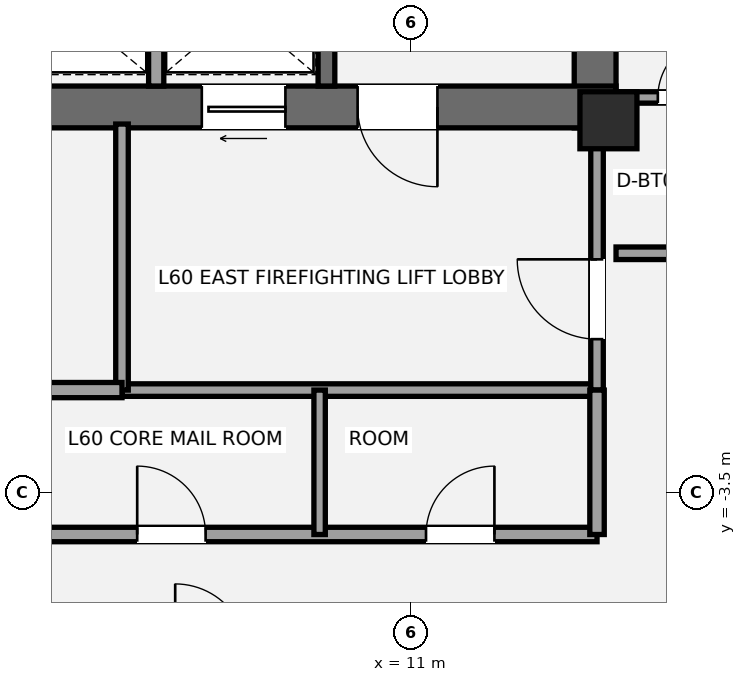
"""IFC4 building model, lengths in metres.
Left out: names, types, materials, properties, quantities, classifications, styles, units other than length and angle.
Written with IfcOpenShell. Run it as: python <this file> out.ifc"""

import sys

from ifc_helpers import new_model, si_unit, direction, frame, frame_2d, origin, origin_2d, place, context, subcontext, project, spatial, rectangle, extrude, element, fill, save


model = new_model("IFC4")
c1 = context("Model", 3, precision=1e-05, world=origin(), true_north=direction((0.0, 1.0)))
c2 = subcontext(c1, "Body", "Model", "MODEL_VIEW")
j1 = project(units=[si_unit("LENGTHUNIT", "METRE"), si_unit("PLANEANGLEUNIT", "RADIAN")], contexts=[c1])
p1 = place(None, origin())
s1 = spatial("IfcSite", under=j1, at=p1, CompositionType="ELEMENT")
p2 = place(p1, origin())
s2 = spatial("IfcBuilding", under=s1, at=p2, CompositionType="ELEMENT")
p3 = place(p2, frame((0.0, 0.0, 216.3)))
s3 = spatial("IfcBuildingStorey", under=s2, at=p3, CompositionType="ELEMENT", Elevation=216.3)
p4 = place(p3, frame((13.425, 1.3, 0.0), z_axis=(0.0, 0.0, 1.0), x_axis=(0.0, 1.0, 0.0)))
e1 = element("IfcWall", 1, at=p4, inside=s3, PredefinedType="SHEAR", context=c2, shape_type="SweptSolid", body=[
    extrude(rectangle(XDim=8.25, YDim=0.55, at=frame_2d((4.125, 0.0))), origin(), (0.0, 0.0, 1.0), 3.15),
])
p5 = place(p3, frame((13.7, 1.575, 0.0), z_axis=(0.0, 0.0, 1.0), x_axis=(-1.0, 0.0, 0.0)))
e2 = element("IfcWall", 2, at=p5, inside=s3, PredefinedType="SHEAR", context=c2, shape_type="SweptSolid", body=[
    extrude(rectangle(XDim=8.775, YDim=0.55, at=frame_2d((4.387, 0.0))), origin(), (0.0, 0.0, 1.0), 3.15),
])
p6 = place(p5, frame((2.35, 0.0, 0.0)))
e3 = element("IfcOpeningElement", 3, at=p6, cuts=e2, PredefinedType="OPENING", context=c2, shape_type="SweptSolid", body=[
    extrude(rectangle(XDim=1.05, YDim=2.15, at=frame_2d((0.525, 1.075))), frame((0.0, 0.285, 0.0), z_axis=(0.0, -1.0, 0.0), x_axis=(1.0, 0.0, 0.0)), (0.0, 0.0, 1.0), 0.57),
])
p7 = place(p5, frame((4.35, 0.0, 0.0)))
e4 = element("IfcOpeningElement", 4, at=p7, cuts=e2, PredefinedType="OPENING", context=c2, shape_type="SweptSolid", body=[
    extrude(rectangle(XDim=1.1, YDim=2.2, at=frame_2d((0.55, 1.1))), frame((0.0, 0.285, 0.0), z_axis=(0.0, -1.0, 0.0), x_axis=(1.0, 0.0, 0.0)), (0.0, 0.0, 1.0), 0.57),
])
p8 = place(p3, frame((9.89, 1.85, 0.0), z_axis=(0.0, 0.0, 1.0), x_axis=(0.0, 1.0, 0.0)))
e5 = element("IfcWall", 5, at=p8, inside=s3, PredefinedType="SHEAR", context=c2, shape_type="SweptSolid", body=[
    extrude(rectangle(XDim=7.15, YDim=0.22, at=frame_2d((3.575, 0.0))), origin(), (0.0, 0.0, 1.0), 3.15),
])
p9 = place(p3, frame((13.6, 1.4, 0.0), z_axis=(0.0, 0.0, 1.0), x_axis=(1.0, 0.0, 0.0)))
e6 = element("IfcColumn", 6, at=p9, inside=s3, PredefinedType="PILASTER", context=c2, shape_type="SweptSolid", body=[
    extrude(rectangle(XDim=0.75, YDim=0.75, at=origin_2d()), origin(), (0.0, 0.0, 1.0), 3.15),
])
p10 = place(p3, frame((7.2, -2.15, 0.0), z_axis=(0.0, 0.0, 1.0), x_axis=(1.0, 0.0, 0.0)))
e7 = element("IfcWall", 7, at=p10, inside=s3, PredefinedType="PARTITIONING", context=c2, shape_type="SweptSolid", body=[
    extrude(rectangle(XDim=6.25, YDim=0.165, at=frame_2d((3.125, 0.0))), origin(), (0.0, 0.0, 1.0), 2.97),
])
p11 = place(p3, frame((7.2, -2.15, 0.0), z_axis=(0.0, 0.0, 1.0), x_axis=(0.0, 1.0, 0.0)))
e8 = element("IfcWall", 8, at=p11, inside=s3, PredefinedType="PARTITIONING", context=c2, shape_type="SweptSolid", body=[
    extrude(rectangle(XDim=3.5, YDim=0.165, at=frame_2d((1.75, 0.0))), origin(), (0.0, 0.0, 1.0), 2.423),
])
p12 = place(p3, frame((13.45, -2.15, 0.0), z_axis=(0.0, 0.0, 1.0), x_axis=(0.0, 1.0, 0.0)))
e9 = element("IfcWall", 9, at=p12, inside=s3, PredefinedType="PARTITIONING", context=c2, shape_type="SweptSolid", body=[
    extrude(rectangle(XDim=3.5, YDim=0.165, at=frame_2d((1.75, 0.0))), origin(), (0.0, 0.0, 1.0), 2.423),
])
p13 = place(p12, frame((0.67, 0.0, 0.0)))
e10 = element("IfcOpeningElement", 10, at=p13, cuts=e9, PredefinedType="OPENING", context=c2, shape_type="SweptSolid", body=[
    extrude(rectangle(XDim=1.05, YDim=2.15, at=frame_2d((0.525, 1.075))), frame((0.0, 0.093, 0.0), z_axis=(0.0, -1.0, 0.0), x_axis=(1.0, 0.0, 0.0)), (0.0, 0.0, 1.0), 0.185),
])
p14 = place(p3, frame((4.95, -2.15, 0.0), z_axis=(0.0, 0.0, 1.0), x_axis=(1.0, 0.0, 0.0)))
e11 = element("IfcWall", 11, at=p14, inside=s3, PredefinedType="SOLIDWALL", context=c2, shape_type="SweptSolid", body=[
    extrude(rectangle(XDim=2.25, YDim=0.2, at=frame_2d((1.125, 0.0))), origin(), (0.0, 0.0, 1.0), 2.97),
])
p15 = place(p3, frame((7.65, 1.85, 0.0), z_axis=(0.0, 0.0, 1.0), x_axis=(0.0, 1.0, 0.0)))
e12 = element("IfcWall", 12, at=p15, inside=s3, PredefinedType="SOLIDWALL", context=c2, shape_type="SweptSolid", body=[
    extrude(rectangle(XDim=1.97, YDim=0.2, at=frame_2d((0.985, 0.0))), origin(), (0.0, 0.0, 1.0), 2.97),
])
p16 = place(p3, frame((2.1, -4.05, 0.0), z_axis=(0.0, 0.0, 1.0), x_axis=(1.0, 0.0, 0.0)))
e13 = element("IfcWall", 13, at=p16, inside=s3, PredefinedType="PLUMBINGWALL", context=c2, shape_type="SweptSolid", body=[
    extrude(rectangle(XDim=11.35, YDim=0.19, at=frame_2d((5.675, 0.0))), origin(), (0.0, 0.0, 1.0), 2.357),
])
p17 = place(p16, frame((1.4, 0.0, 0.0)))
e14 = element("IfcOpeningElement", 14, at=p17, cuts=e13, PredefinedType="OPENING", context=c2, shape_type="SweptSolid", body=[
    extrude(rectangle(XDim=0.9, YDim=2.1, at=frame_2d((0.45, 1.05))), frame((0.0, 0.105, 0.0), z_axis=(0.0, -1.0, 0.0), x_axis=(1.0, 0.0, 0.0)), (0.0, 0.0, 1.0), 0.21),
])
p18 = place(p16, frame((5.3, 0.0, 0.0)))
e15 = element("IfcOpeningElement", 15, at=p18, cuts=e13, PredefinedType="OPENING", context=c2, shape_type="SweptSolid", body=[
    extrude(rectangle(XDim=0.9, YDim=2.1, at=frame_2d((0.45, 1.05))), frame((0.0, 0.105, 0.0), z_axis=(0.0, -1.0, 0.0), x_axis=(1.0, 0.0, 0.0)), (0.0, 0.0, 1.0), 0.21),
])
p19 = place(p16, frame((9.1, 0.0, 0.0)))
e16 = element("IfcOpeningElement", 16, at=p19, cuts=e13, PredefinedType="OPENING", context=c2, shape_type="SweptSolid", body=[
    extrude(rectangle(XDim=0.9, YDim=2.1, at=frame_2d((0.45, 1.05))), frame((0.0, 0.105, 0.0), z_axis=(0.0, -1.0, 0.0), x_axis=(1.0, 0.0, 0.0)), (0.0, 0.0, 1.0), 0.21),
])
p20 = place(p3, frame((13.45, -4.05, 0.0), z_axis=(0.0, 0.0, 1.0), x_axis=(0.0, 1.0, 0.0)))
e17 = element("IfcWall", 17, at=p20, inside=s3, PredefinedType="PLUMBINGWALL", context=c2, shape_type="SweptSolid", body=[
    extrude(rectangle(XDim=1.9, YDim=0.19, at=frame_2d((0.95, 0.0))), origin(), (0.0, 0.0, 1.0), 2.423),
])
p21 = place(p3, frame((9.8, -4.05, 0.0), z_axis=(0.0, 0.0, 1.0), x_axis=(0.0, 1.0, 0.0)))
e18 = element("IfcWall", 18, at=p21, inside=s3, PredefinedType="PLUMBINGWALL", context=c2, shape_type="SweptSolid", body=[
    extrude(rectangle(XDim=1.9, YDim=0.15, at=frame_2d((0.95, 0.0))), origin(), (0.0, 0.0, 1.0), 2.97),
])
p22 = place(p3, frame((13.7, -0.35, 0.0), z_axis=(0.0, 0.0, 1.0), x_axis=(1.0, 0.0, 0.0)))
e19 = element("IfcWall", 19, at=p22, inside=s3, PredefinedType="PARTITIONING", context=c2, shape_type="SweptSolid", body=[
    extrude(rectangle(XDim=1.85, YDim=0.165, at=frame_2d((0.925, 0.0))), origin(), (0.0, 0.0, 1.0), 2.423),
])
p23 = place(p3, frame((13.7, 1.7, 0.0), z_axis=(0.0, 0.0, 1.0), x_axis=(1.0, 0.0, 0.0)))
e20 = element("IfcWall", 20, at=p23, inside=s3, PredefinedType="PLUMBINGWALL", context=c2, shape_type="SweptSolid", body=[
    extrude(rectangle(XDim=4.25, YDim=0.15, at=frame_2d((2.125, 0.0))), origin(), (0.0, 0.0, 1.0), 2.423),
])
p24 = place(p23, frame((0.55, 0.0, 0.0)))
e21 = element("IfcOpeningElement", 21, at=p24, cuts=e20, PredefinedType="OPENING", context=c2, shape_type="SweptSolid", body=[
    extrude(rectangle(XDim=0.8, YDim=2.1, at=frame_2d((0.4, 1.05))), frame((0.0, 0.085, 0.0), z_axis=(0.0, -1.0, 0.0), x_axis=(1.0, 0.0, 0.0)), (0.0, 0.0, 1.0), 0.17),
])
p25 = place(p23, frame((2.15, 0.0, 0.0)))
e22 = element("IfcOpeningElement", 22, at=p25, cuts=e20, PredefinedType="OPENING", context=c2, shape_type="SweptSolid", body=[
    extrude(rectangle(XDim=0.85, YDim=2.1, at=frame_2d((0.425, 1.05))), frame((0.0, 0.085, 0.0), z_axis=(0.0, -1.0, 0.0), x_axis=(1.0, 0.0, 0.0)), (0.0, 0.0, 1.0), 0.17),
])
p26 = place(p6, origin())
e23 = element("IfcDoor", 23, at=p26, inside=s3, OperationType="SINGLE_SWING_LEFT", PredefinedType="DOOR", context=c2, shape_type="SweptSolid", body=[
    extrude(rectangle(XDim=1.05, YDim=2.15, at=frame_2d((0.525, 1.075))), frame((0.0, 0.025, 0.0), z_axis=(0.0, -1.0, 0.0), x_axis=(1.0, 0.0, 0.0)), (0.0, 0.0, 1.0), 0.05),
])
fill(e3, e23)
p27 = place(p13, origin())
e24 = element("IfcDoor", 24, at=p27, inside=s3, OperationType="SINGLE_SWING_RIGHT", PredefinedType="DOOR", context=c2, shape_type="SweptSolid", body=[
    extrude(rectangle(XDim=1.05, YDim=2.15, at=frame_2d((0.525, 1.075))), frame((0.0, 0.025, 0.0), z_axis=(0.0, -1.0, 0.0), x_axis=(1.0, 0.0, 0.0)), (0.0, 0.0, 1.0), 0.05),
])
fill(e10, e24)
p28 = place(p7, origin())
e25 = element("IfcDoor", 25, at=p28, inside=s3, OperationType="SLIDING_TO_LEFT", PredefinedType="DOOR", context=c2, shape_type="SweptSolid", body=[
    extrude(rectangle(XDim=1.1, YDim=2.2, at=frame_2d((0.55, 1.1))), frame((0.0, 0.025, 0.0), z_axis=(0.0, -1.0, 0.0), x_axis=(1.0, 0.0, 0.0)), (0.0, 0.0, 1.0), 0.05),
])
fill(e4, e25)
p29 = place(p18, origin())
e26 = element("IfcDoor", 26, at=p29, inside=s3, OperationType="SINGLE_SWING_LEFT", PredefinedType="DOOR", context=c2, shape_type="SweptSolid", body=[
    extrude(rectangle(XDim=0.9, YDim=2.1, at=frame_2d((0.45, 1.05))), frame((0.0, 0.025, 0.0), z_axis=(0.0, -1.0, 0.0), x_axis=(1.0, 0.0, 0.0)), (0.0, 0.0, 1.0), 0.05),
])
fill(e15, e26)
p30 = place(p19, origin())
e27 = element("IfcDoor", 27, at=p30, inside=s3, OperationType="SINGLE_SWING_RIGHT", PredefinedType="DOOR", context=c2, shape_type="SweptSolid", body=[
    extrude(rectangle(XDim=0.9, YDim=2.1, at=frame_2d((0.45, 1.05))), frame((0.0, 0.025, 0.0), z_axis=(0.0, -1.0, 0.0), x_axis=(1.0, 0.0, 0.0)), (0.0, 0.0, 1.0), 0.05),
])
fill(e16, e27)
p31 = place(p24, origin())
e28 = element("IfcDoor", 28, at=p31, inside=s3, OperationType="SINGLE_SWING_RIGHT", PredefinedType="DOOR", context=c2, shape_type="SweptSolid", body=[
    extrude(rectangle(XDim=0.8, YDim=2.1, at=frame_2d((0.4, 1.05))), frame((0.0, 0.025, 0.0), z_axis=(0.0, -1.0, 0.0), x_axis=(1.0, 0.0, 0.0)), (0.0, 0.0, 1.0), 0.05),
])
fill(e21, e28)
save(model, sys.argv[1])
